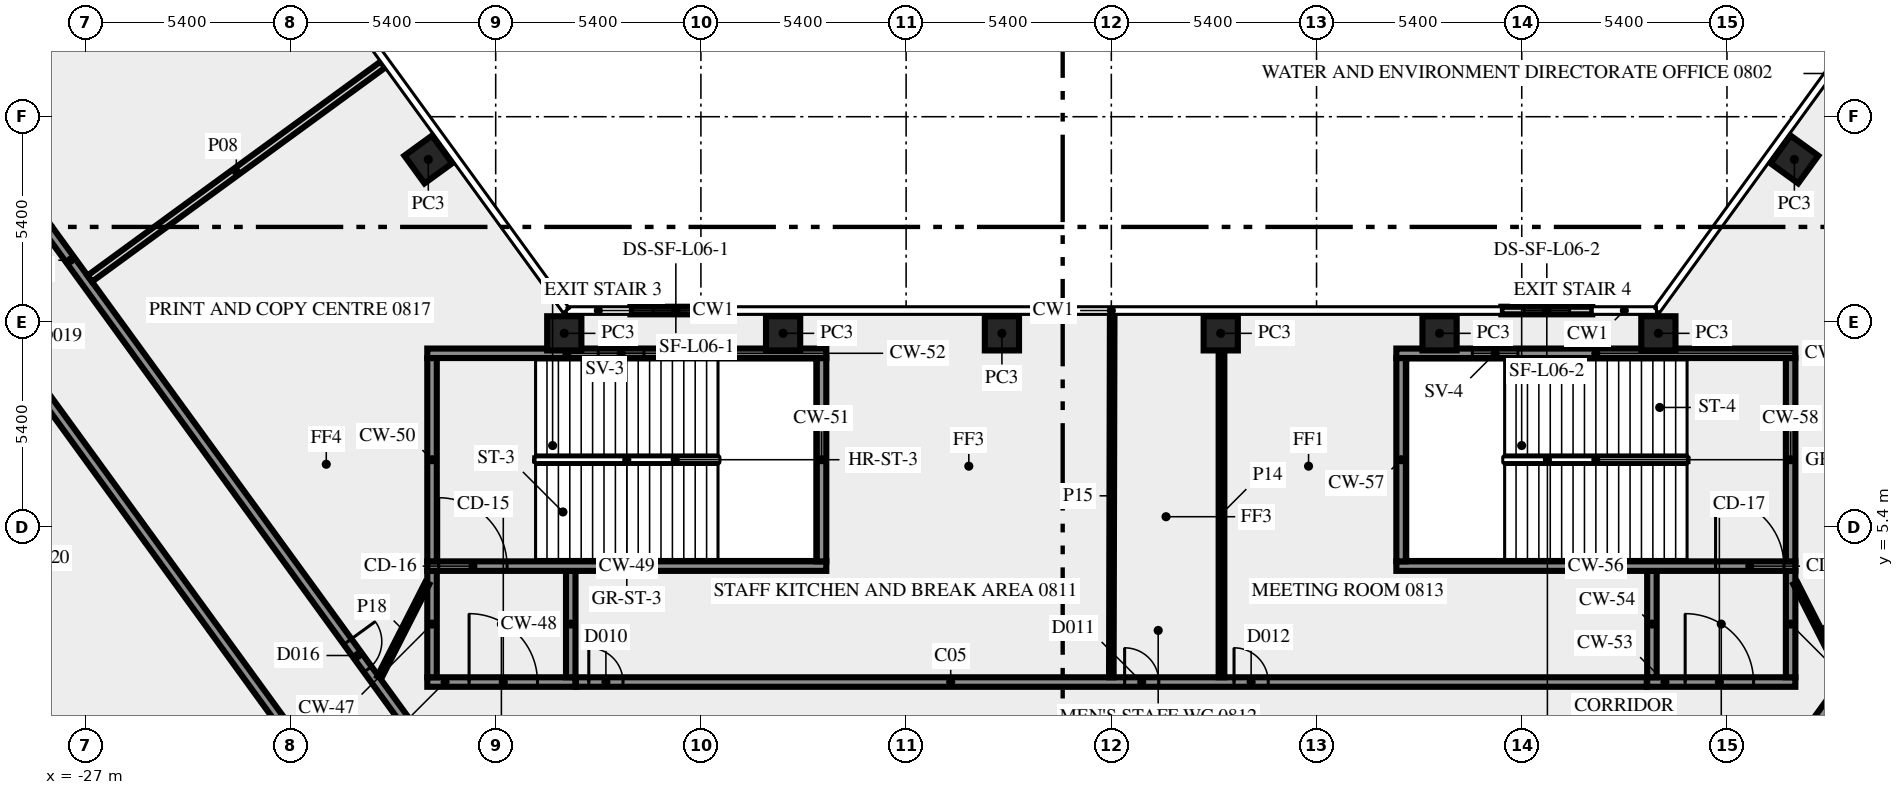
"""IFC4 building model, lengths in metres.
Left out: names, types, materials, properties, quantities, classifications, styles, units other than length and angle.
Written with IfcOpenShell. Run it as: python <this file> out.ifc"""

import sys

from ifc_helpers import new_model, si_unit, direction, frame, frame_2d, origin, origin_2d, place, context, subcontext, project, spatial, rectangle, extrude, element, fill, save


model = new_model("IFC4")
c1 = context("Model", 3, precision=1e-05, world=origin(), true_north=direction((0.0, 1.0)))
c2 = subcontext(c1, "Body", "Model", "MODEL_VIEW")
j1 = project(units=[si_unit("LENGTHUNIT", "METRE"), si_unit("PLANEANGLEUNIT", "RADIAN")], contexts=[c1])
p1 = place(None, origin())
s1 = spatial("IfcSite", under=j1, at=p1, CompositionType="ELEMENT")
p2 = place(p1, origin())
s2 = spatial("IfcBuilding", under=s1, at=p2, CompositionType="ELEMENT")
p3 = place(p2, frame((0.0, 0.0, 39.0)))
s3 = spatial("IfcBuildingStorey", under=s2, at=p3, CompositionType="ELEMENT", Elevation=39.0)
for number, where, z_axis, x_axis in (
    (1, (-17.974, 15.075, 0.0), (0.0, 0.0, 1.0), (-0.588, 0.809, 0.0)),
    (2, (17.974, 15.075, 0.0), (0.0, 0.0, 1.0), (-0.588, -0.809, 0.0)),
    (3, (14.395, 10.5, 0.0), (0.0, 0.0, 1.0), (-1.0, 0.0, 0.0)),
    (4, (8.637, 10.5, 0.0), (0.0, 0.0, 1.0), (-1.0, 0.0, 0.0)),
    (5, (2.879, 10.5, 0.0), (0.0, 0.0, 1.0), (-1.0, 0.0, 0.0)),
    (6, (-2.879, 10.5, 0.0), (0.0, 0.0, 1.0), (-1.0, 0.0, 0.0)),
    (7, (-8.637, 10.5, 0.0), (0.0, 0.0, 1.0), (-1.0, 0.0, 0.0)),
    (8, (-14.395, 10.5, 0.0), (0.0, 0.0, 1.0), (-1.0, 0.0, 0.0)),
):
    element("IfcColumn", number, at=place(p3, frame(where, z_axis=z_axis, x_axis=x_axis)), inside=s3, PredefinedType="COLUMN", context=c2, shape_type="SweptSolid", body=[
        extrude(rectangle(XDim=0.9, YDim=0.9, at=origin_2d()), origin(), (0.0, 0.0, 1.0), 3.65),
    ])
p4 = place(p3, frame((12.655, 11.1, 0.0), z_axis=(0.0, 0.0, 1.0), x_axis=(-1.0, 0.0, 0.0)))
e9 = element("IfcWall", 9, at=p4, inside=s3, PredefinedType="SOLIDWALL", context=c2, shape_type="SweptSolid", body=[
    extrude(rectangle(XDim=2.392, YDim=0.2, at=frame_2d((1.196, 0.0))), origin(), (0.0, 0.0, 1.0), 3.65),
])
p5 = place(p4, frame((0.596, 0.0, 1.0)))
e10 = element("IfcOpeningElement", 10, at=p5, cuts=e9, PredefinedType="OPENING", context=c2, shape_type="SweptSolid", body=[
    extrude(rectangle(XDim=1.2, YDim=1.2, at=frame_2d((0.6, 0.6))), frame((0.0, 0.11, 0.0), z_axis=(0.0, -1.0, 0.0), x_axis=(1.0, 0.0, 0.0)), (0.0, 0.0, 1.0), 0.22),
])
p6 = place(p3, frame((-10.263, 11.1, 0.0), z_axis=(0.0, 0.0, 1.0), x_axis=(-1.0, 0.0, 0.0)))
e11 = element("IfcWall", 11, at=p6, inside=s3, PredefinedType="SOLIDWALL", context=c2, shape_type="SweptSolid", body=[
    extrude(rectangle(XDim=2.392, YDim=0.2, at=frame_2d((1.196, 0.0))), origin(), (0.0, 0.0, 1.0), 3.65),
])
p7 = place(p6, frame((0.596, 0.0, 1.0)))
e12 = element("IfcOpeningElement", 12, at=p7, cuts=e11, PredefinedType="OPENING", context=c2, shape_type="SweptSolid", body=[
    extrude(rectangle(XDim=1.2, YDim=1.2, at=frame_2d((0.6, 0.6))), frame((0.0, 0.11, 0.0), z_axis=(0.0, -1.0, 0.0), x_axis=(1.0, 0.0, 0.0)), (0.0, 0.0, 1.0), 0.22),
])
p8 = place(p3, frame((-18.0, 1.325, 0.0), z_axis=(0.0, 0.0, 1.0), x_axis=(1.0, 0.0, 0.0)))
e13 = element("IfcWall", 13, at=p8, inside=s3, PredefinedType="SHEAR", context=c2, shape_type="SweptSolid", body=[
    extrude(rectangle(XDim=3.9, YDim=0.25, at=frame_2d((1.95, 0.0))), origin(), (0.0, 0.0, 1.0), 3.65),
])
p9 = place(p8, frame((1.1, 0.0, 0.0)))
e14 = element("IfcOpeningElement", 14, at=p9, cuts=e13, PredefinedType="OPENING", context=c2, shape_type="SweptSolid", body=[
    extrude(rectangle(XDim=1.8, YDim=2.1, at=frame_2d((0.9, 1.05))), frame((0.0, 0.135, 0.0), z_axis=(0.0, -1.0, 0.0), x_axis=(1.0, 0.0, 0.0)), (0.0, 0.0, 1.0), 0.27),
])
for number, where, z_axis, x_axis in (
    (15, (-17.875, 1.45, 0.0), (0.0, 0.0, 1.0), (0.0, 1.0, 0.0)),
    (16, (-14.225, 1.45, 0.0), (0.0, 0.0, 1.0), (0.0, 1.0, 0.0)),
):
    element("IfcWall", number, at=place(p3, frame(where, z_axis=z_axis, x_axis=x_axis)), inside=s3, PredefinedType="SHEAR", context=c2, shape_type="SweptSolid", body=[
        extrude(rectangle(XDim=2.8, YDim=0.25, at=frame_2d((1.4, 0.0))), origin(), (0.0, 0.0, 1.0), 3.65),
    ])
p10 = place(p3, frame((-18.0, 4.375, 0.0), z_axis=(0.0, 0.0, 1.0), x_axis=(1.0, 0.0, 0.0)))
e17 = element("IfcWall", 17, at=p10, inside=s3, PredefinedType="SHEAR", context=c2, shape_type="SweptSolid", body=[
    extrude(rectangle(XDim=10.5, YDim=0.25, at=frame_2d((5.25, 0.0))), origin(), (0.0, 0.0, 1.0), 3.65),
])
p11 = place(p10, frame((0.3, 0.0, 0.0)))
e18 = element("IfcOpeningElement", 18, at=p11, cuts=e17, PredefinedType="OPENING", context=c2, shape_type="SweptSolid", body=[
    extrude(rectangle(XDim=1.8, YDim=2.1, at=frame_2d((0.9, 1.05))), frame((0.0, 0.135, 0.0), z_axis=(0.0, -1.0, 0.0), x_axis=(1.0, 0.0, 0.0)), (0.0, 0.0, 1.0), 0.27),
])
for number, where, z_axis, x_axis in (
    (19, (-17.875, 4.5, 0.0), (0.0, 0.0, 1.0), (0.0, 1.0, 0.0)),
    (20, (-7.625, 4.5, 0.0), (0.0, 0.0, 1.0), (0.0, 1.0, 0.0)),
):
    element("IfcWall", number, at=place(p3, frame(where, z_axis=z_axis, x_axis=x_axis)), inside=s3, PredefinedType="SHEAR", context=c2, shape_type="SweptSolid", body=[
        extrude(rectangle(XDim=5.35, YDim=0.25, at=frame_2d((2.675, 0.0))), origin(), (0.0, 0.0, 1.0), 3.65),
    ])
p12 = place(p3, frame((-18.0, 9.975, 0.0), z_axis=(0.0, 0.0, 1.0), x_axis=(1.0, 0.0, 0.0)))
e21 = element("IfcWall", 21, at=p12, inside=s3, PredefinedType="SHEAR", context=c2, shape_type="SweptSolid", body=[
    extrude(rectangle(XDim=10.5, YDim=0.25, at=frame_2d((5.25, 0.0))), origin(), (0.0, 0.0, 1.0), 3.65),
])
p13 = place(p12, frame((4.5, 0.0, 1.0)))
e22 = element("IfcOpeningElement", 22, at=p13, cuts=e21, PredefinedType="OPENING", context=c2, shape_type="SweptSolid", body=[
    extrude(rectangle(XDim=1.2, YDim=1.2, at=frame_2d((0.6, 0.6))), frame((0.0, 0.135, 0.0), z_axis=(0.0, -1.0, 0.0), x_axis=(1.0, 0.0, 0.0)), (0.0, 0.0, 1.0), 0.27),
])
p14 = place(p3, frame((14.1, 1.325, 0.0), z_axis=(0.0, 0.0, 1.0), x_axis=(1.0, 0.0, 0.0)))
e23 = element("IfcWall", 23, at=p14, inside=s3, PredefinedType="SHEAR", context=c2, shape_type="SweptSolid", body=[
    extrude(rectangle(XDim=3.9, YDim=0.25, at=frame_2d((1.95, 0.0))), origin(), (0.0, 0.0, 1.0), 3.65),
])
p15 = place(p14, frame((1.0, 0.0, 0.0)))
e24 = element("IfcOpeningElement", 24, at=p15, cuts=e23, PredefinedType="OPENING", context=c2, shape_type="SweptSolid", body=[
    extrude(rectangle(XDim=1.8, YDim=2.1, at=frame_2d((0.9, 1.05))), frame((0.0, 0.135, 0.0), z_axis=(0.0, -1.0, 0.0), x_axis=(1.0, 0.0, 0.0)), (0.0, 0.0, 1.0), 0.27),
])
for number, where, z_axis, x_axis in (
    (25, (14.225, 1.45, 0.0), (0.0, 0.0, 1.0), (0.0, 1.0, 0.0)),
    (26, (17.875, 1.45, 0.0), (0.0, 0.0, 1.0), (0.0, 1.0, 0.0)),
):
    element("IfcWall", number, at=place(p3, frame(where, z_axis=z_axis, x_axis=x_axis)), inside=s3, PredefinedType="SHEAR", context=c2, shape_type="SweptSolid", body=[
        extrude(rectangle(XDim=2.8, YDim=0.25, at=frame_2d((1.4, 0.0))), origin(), (0.0, 0.0, 1.0), 3.65),
    ])
p16 = place(p3, frame((7.5, 4.375, 0.0), z_axis=(0.0, 0.0, 1.0), x_axis=(1.0, 0.0, 0.0)))
e27 = element("IfcWall", 27, at=p16, inside=s3, PredefinedType="SHEAR", context=c2, shape_type="SweptSolid", body=[
    extrude(rectangle(XDim=10.5, YDim=0.25, at=frame_2d((5.25, 0.0))), origin(), (0.0, 0.0, 1.0), 3.65),
])
p17 = place(p16, frame((8.4, 0.0, 0.0)))
e28 = element("IfcOpeningElement", 28, at=p17, cuts=e27, PredefinedType="OPENING", context=c2, shape_type="SweptSolid", body=[
    extrude(rectangle(XDim=1.8, YDim=2.1, at=frame_2d((0.9, 1.05))), frame((0.0, 0.135, 0.0), z_axis=(0.0, -1.0, 0.0), x_axis=(1.0, 0.0, 0.0)), (0.0, 0.0, 1.0), 0.27),
])
for number, where, z_axis, x_axis in (
    (29, (7.625, 4.5, 0.0), (0.0, 0.0, 1.0), (0.0, 1.0, 0.0)),
    (30, (17.875, 4.5, 0.0), (0.0, 0.0, 1.0), (0.0, 1.0, 0.0)),
):
    element("IfcWall", number, at=place(p3, frame(where, z_axis=z_axis, x_axis=x_axis)), inside=s3, PredefinedType="SHEAR", context=c2, shape_type="SweptSolid", body=[
        extrude(rectangle(XDim=5.35, YDim=0.25, at=frame_2d((2.675, 0.0))), origin(), (0.0, 0.0, 1.0), 3.65),
    ])
p18 = place(p3, frame((7.5, 9.975, 0.0), z_axis=(0.0, 0.0, 1.0), x_axis=(1.0, 0.0, 0.0)))
e31 = element("IfcWall", 31, at=p18, inside=s3, PredefinedType="SHEAR", context=c2, shape_type="SweptSolid", body=[
    extrude(rectangle(XDim=10.5, YDim=0.25, at=frame_2d((5.25, 0.0))), origin(), (0.0, 0.0, 1.0), 3.65),
])
p19 = place(p18, frame((2.0, 0.0, 1.0)))
e32 = element("IfcOpeningElement", 32, at=p19, cuts=e31, PredefinedType="OPENING", context=c2, shape_type="SweptSolid", body=[
    extrude(rectangle(XDim=1.2, YDim=1.2, at=frame_2d((0.6, 0.6))), frame((0.0, 0.135, 0.0), z_axis=(0.0, -1.0, 0.0), x_axis=(1.0, 0.0, 0.0)), (0.0, 0.0, 1.0), 0.27),
])
p20 = place(p3, frame((-20.531, -1.523, 0.0), z_axis=(0.0, 0.0, 1.0), x_axis=(-0.587784593204, 0.809017473231, 0.0)))
e33 = element("IfcWall", 33, at=p20, inside=s3, PredefinedType="SOLIDWALL", context=c2, shape_type="SweptSolid", body=[
    extrude(rectangle(XDim=44.67, YDim=0.25, at=frame_2d((22.335, 0.0))), origin(), (0.0, 0.0, 1.0), 3.65),
])
p21 = place(p20, frame((30.765, 0.0, 0.0)))
e34 = element("IfcOpeningElement", 34, at=p21, cuts=e33, PredefinedType="OPENING", context=c2, shape_type="SweptSolid", body=[
    extrude(rectangle(XDim=0.9, YDim=2.1, at=frame_2d((0.45, 1.05))), frame((0.0, 0.135, 0.0), z_axis=(0.0, -1.0, 0.0), x_axis=(1.0, 0.0, 0.0)), (0.0, 0.0, 1.0), 0.27),
])
p22 = place(p20, frame((14.316, 0.0, 0.0)))
e35 = element("IfcOpeningElement", 35, at=p22, cuts=e33, PredefinedType="OPENING", context=c2, shape_type="SweptSolid", body=[
    extrude(rectangle(XDim=0.9, YDim=2.1, at=frame_2d((0.45, 1.05))), frame((0.0, 0.135, 0.0), z_axis=(0.0, -1.0, 0.0), x_axis=(1.0, 0.0, 0.0)), (0.0, 0.0, 1.0), 0.27),
])
p23 = place(p20, frame((29.166, 0.0, 0.0)))
e36 = element("IfcOpeningElement", 36, at=p23, cuts=e33, PredefinedType="OPENING", context=c2, shape_type="SweptSolid", body=[
    extrude(rectangle(XDim=0.9, YDim=2.1, at=frame_2d((0.45, 1.05))), frame((0.0, 0.135, 0.0), z_axis=(0.0, -1.0, 0.0), x_axis=(1.0, 0.0, 0.0)), (0.0, 0.0, 1.0), 0.27),
])
p24 = place(p3, frame((-37.232, 25.972, 0.0), z_axis=(0.0, 0.0, 1.0), x_axis=(0.587786323093, -0.809016216391, 0.0)))
e37 = element("IfcWall", 37, at=p24, inside=s3, PredefinedType="SOLIDWALL", context=c2, shape_type="SweptSolid", body=[
    extrude(rectangle(XDim=33.493, YDim=0.25, at=frame_2d((16.747, 0.0))), origin(), (0.0, 0.0, 1.0), 3.65),
])
p25 = place(p24, frame((8.335, 0.0, 0.0)))
e38 = element("IfcOpeningElement", 38, at=p25, cuts=e37, PredefinedType="OPENING", context=c2, shape_type="SweptSolid", body=[
    extrude(rectangle(XDim=0.9, YDim=2.1, at=frame_2d((0.45, 1.05))), frame((0.0, 0.135, 0.0), z_axis=(0.0, -1.0, 0.0), x_axis=(1.0, 0.0, 0.0)), (0.0, 0.0, 1.0), 0.27),
])
p26 = place(p24, frame((29.152, 0.0, 0.0)))
e39 = element("IfcOpeningElement", 39, at=p26, cuts=e37, PredefinedType="OPENING", context=c2, shape_type="SweptSolid", body=[
    extrude(rectangle(XDim=0.9, YDim=2.1, at=frame_2d((0.45, 1.05))), frame((0.0, 0.135, 0.0), z_axis=(0.0, -1.0, 0.0), x_axis=(1.0, 0.0, 0.0)), (0.0, 0.0, 1.0), 0.27),
])
p27 = place(p24, frame((6.735, 0.0, 0.0)))
e40 = element("IfcOpeningElement", 40, at=p27, cuts=e37, PredefinedType="OPENING", context=c2, shape_type="SweptSolid", body=[
    extrude(rectangle(XDim=0.9, YDim=2.1, at=frame_2d((0.45, 1.05))), frame((0.0, 0.135, 0.0), z_axis=(0.0, -1.0, 0.0), x_axis=(1.0, 0.0, 0.0)), (0.0, 0.0, 1.0), 0.27),
])
p28 = place(p3, frame((-14.09, 1.325, 0.0), z_axis=(0.0, 0.0, 1.0), x_axis=(1.0, 0.0, 0.0)))
e41 = element("IfcWall", 41, at=p28, inside=s3, PredefinedType="SOLIDWALL", context=c2, shape_type="SweptSolid", body=[
    extrude(rectangle(XDim=28.18, YDim=0.25, at=frame_2d((14.09, 0.0))), origin(), (0.0, 0.0, 1.0), 3.65),
])
p29 = place(p28, frame((17.319, 0.0, 0.0)))
e42 = element("IfcOpeningElement", 42, at=p29, cuts=e41, PredefinedType="OPENING", context=c2, shape_type="SweptSolid", body=[
    extrude(rectangle(XDim=0.9, YDim=2.1, at=frame_2d((0.45, 1.05))), frame((0.0, 0.135, 0.0), z_axis=(0.0, -1.0, 0.0), x_axis=(1.0, 0.0, 0.0)), (0.0, 0.0, 1.0), 0.27),
])
p30 = place(p28, frame((14.44, 0.0, 0.0)))
e43 = element("IfcOpeningElement", 43, at=p30, cuts=e41, PredefinedType="OPENING", context=c2, shape_type="SweptSolid", body=[
    extrude(rectangle(XDim=0.9, YDim=2.1, at=frame_2d((0.45, 1.05))), frame((0.0, 0.135, 0.0), z_axis=(0.0, -1.0, 0.0), x_axis=(1.0, 0.0, 0.0)), (0.0, 0.0, 1.0), 0.27),
])
p31 = place(p28, frame((0.34, 0.0, 0.0)))
e44 = element("IfcOpeningElement", 44, at=p31, cuts=e41, PredefinedType="OPENING", context=c2, shape_type="SweptSolid", body=[
    extrude(rectangle(XDim=0.9, YDim=2.1, at=frame_2d((0.45, 1.05))), frame((0.0, 0.135, 0.0), z_axis=(0.0, -1.0, 0.0), x_axis=(1.0, 0.0, 0.0)), (0.0, 0.0, 1.0), 0.27),
])
p32 = place(p3, frame((17.545, -1.125, 0.0), z_axis=(0.0, 0.0, 1.0), x_axis=(0.587786323093, 0.809016216391, 0.0)))
e45 = element("IfcWall", 45, at=p32, inside=s3, PredefinedType="SOLIDWALL", context=c2, shape_type="SweptSolid", body=[
    extrude(rectangle(XDim=33.493, YDim=0.25, at=frame_2d((16.747, 0.0))), origin(), (0.0, 0.0, 1.0), 3.65),
])
p33 = place(p32, frame((25.857, 0.0, 0.0)))
e46 = element("IfcOpeningElement", 46, at=p33, cuts=e45, PredefinedType="OPENING", context=c2, shape_type="SweptSolid", body=[
    extrude(rectangle(XDim=0.9, YDim=2.1, at=frame_2d((0.45, 1.05))), frame((0.0, 0.135, 0.0), z_axis=(0.0, -1.0, 0.0), x_axis=(1.0, 0.0, 0.0)), (0.0, 0.0, 1.0), 0.27),
])
p34 = place(p32, frame((24.157, 0.0, 0.0)))
e47 = element("IfcOpeningElement", 47, at=p34, cuts=e45, PredefinedType="OPENING", context=c2, shape_type="SweptSolid", body=[
    extrude(rectangle(XDim=1.0, YDim=2.1, at=frame_2d((0.5, 1.05))), frame((0.0, 0.135, 0.0), z_axis=(0.0, -1.0, 0.0), x_axis=(1.0, 0.0, 0.0)), (0.0, 0.0, 1.0), 0.27),
])
p35 = place(p3, frame((-26.882, 11.94, 0.0), z_axis=(0.0, 0.0, 1.0), x_axis=(0.807664588563, 0.589642190131, 0.0)))
e48 = element("IfcWall", 48, at=p35, inside=s3, PredefinedType="SOLIDWALL", context=c2, shape_type="SweptSolid", body=[
    extrude(rectangle(XDim=9.55, YDim=0.2, at=frame_2d((4.775, 0.0))), origin(), (0.0, 0.0, 1.0), 2.75),
])
p36 = place(p3, frame((2.899, 10.045, 0.0), z_axis=(0.0, 0.0, 1.0), x_axis=(0.0, -1.0, 0.0)))
e49 = element("IfcWall", 49, at=p36, inside=s3, PredefinedType="PARTITIONING", context=c2, shape_type="SweptSolid", body=[
    extrude(rectangle(XDim=8.595, YDim=0.15, at=frame_2d((4.297, 0.0))), origin(), (0.0, 0.0, 1.0), 3.65),
])
p37 = place(p3, frame((0.023, 11.0, 0.0), z_axis=(0.0, 0.0, 1.0), x_axis=(-0.002377476217, -0.999997173799, 0.0)))
e50 = element("IfcWall", 50, at=p37, inside=s3, PredefinedType="PARTITIONING", context=c2, shape_type="SweptSolid", body=[
    extrude(rectangle(XDim=9.55, YDim=0.12, at=frame_2d((4.775, 0.0))), origin(), (0.0, 0.0, 1.0), 2.75),
])
for number, where, z_axis, x_axis in (
    (51, (18.0, 3.925, 0.0), (0.0, 0.0, 1.0), (0.454, -0.891, 0.0)),
    (52, (-19.261, 1.45, 0.0), (0.0, 0.0, 1.0), (0.454, 0.891, 0.0)),
):
    element("IfcWall", number, at=place(p3, frame(where, z_axis=z_axis, x_axis=x_axis)), inside=s3, PredefinedType="PARTITIONING", context=c2, shape_type="SweptSolid", body=[
        extrude(rectangle(XDim=2.778, YDim=0.12, at=frame_2d((1.389, 0.0))), origin(), (0.0, 0.0, 1.0), 3.65),
    ])
p38 = place(p5, origin())
e53 = element("IfcWindow", 53, at=p38, inside=s3, PartitioningType="SINGLE_PANEL", PredefinedType="WINDOW", context=c2, shape_type="SweptSolid", body=[
    extrude(rectangle(XDim=1.2, YDim=1.2, at=frame_2d((0.6, 0.6))), frame((0.0, 0.03, 0.0), z_axis=(0.0, -1.0, 0.0), x_axis=(1.0, 0.0, 0.0)), (0.0, 0.0, 1.0), 0.06),
])
fill(e10, e53)
p39 = place(p7, origin())
e54 = element("IfcWindow", 54, at=p39, inside=s3, PartitioningType="SINGLE_PANEL", PredefinedType="WINDOW", context=c2, shape_type="SweptSolid", body=[
    extrude(rectangle(XDim=1.2, YDim=1.2, at=frame_2d((0.6, 0.6))), frame((0.0, 0.03, 0.0), z_axis=(0.0, -1.0, 0.0), x_axis=(1.0, 0.0, 0.0)), (0.0, 0.0, 1.0), 0.06),
])
fill(e12, e54)
p40 = place(p9, origin())
e55 = element("IfcDoor", 55, at=p40, inside=s3, OperationType="DOUBLE_DOOR_SINGLE_SWING", PredefinedType="DOOR", context=c2, shape_type="SweptSolid", body=[
    extrude(rectangle(XDim=1.8, YDim=2.1, at=frame_2d((0.9, 1.05))), frame((0.0, 0.025, 0.0), z_axis=(0.0, -1.0, 0.0), x_axis=(1.0, 0.0, 0.0)), (0.0, 0.0, 1.0), 0.05),
])
fill(e14, e55)
p41 = place(p11, origin())
e56 = element("IfcDoor", 56, at=p41, inside=s3, OperationType="DOUBLE_DOOR_SINGLE_SWING", PredefinedType="DOOR", context=c2, shape_type="SweptSolid", body=[
    extrude(rectangle(XDim=1.8, YDim=2.1, at=frame_2d((0.9, 1.05))), frame((0.0, 0.025, 0.0), z_axis=(0.0, -1.0, 0.0), x_axis=(1.0, 0.0, 0.0)), (0.0, 0.0, 1.0), 0.05),
])
fill(e18, e56)
p42 = place(p13, origin())
e57 = element("IfcWindow", 57, at=p42, inside=s3, PartitioningType="SINGLE_PANEL", PredefinedType="WINDOW", context=c2, shape_type="SweptSolid", body=[
    extrude(rectangle(XDim=1.2, YDim=1.2, at=frame_2d((0.6, 0.6))), frame((0.0, 0.03, 0.0), z_axis=(0.0, -1.0, 0.0), x_axis=(1.0, 0.0, 0.0)), (0.0, 0.0, 1.0), 0.06),
])
fill(e22, e57)
p43 = place(p15, origin())
e58 = element("IfcDoor", 58, at=p43, inside=s3, OperationType="DOUBLE_DOOR_SINGLE_SWING", PredefinedType="DOOR", context=c2, shape_type="SweptSolid", body=[
    extrude(rectangle(XDim=1.8, YDim=2.1, at=frame_2d((0.9, 1.05))), frame((0.0, 0.025, 0.0), z_axis=(0.0, -1.0, 0.0), x_axis=(1.0, 0.0, 0.0)), (0.0, 0.0, 1.0), 0.05),
])
fill(e24, e58)
p44 = place(p17, origin())
e59 = element("IfcDoor", 59, at=p44, inside=s3, OperationType="DOUBLE_DOOR_SINGLE_SWING", PredefinedType="DOOR", context=c2, shape_type="SweptSolid", body=[
    extrude(rectangle(XDim=1.8, YDim=2.1, at=frame_2d((0.9, 1.05))), frame((0.0, 0.025, 0.0), z_axis=(0.0, -1.0, 0.0), x_axis=(1.0, 0.0, 0.0)), (0.0, 0.0, 1.0), 0.05),
])
fill(e28, e59)
p45 = place(p19, origin())
e60 = element("IfcWindow", 60, at=p45, inside=s3, PartitioningType="SINGLE_PANEL", PredefinedType="WINDOW", context=c2, shape_type="SweptSolid", body=[
    extrude(rectangle(XDim=1.2, YDim=1.2, at=frame_2d((0.6, 0.6))), frame((0.0, 0.03, 0.0), z_axis=(0.0, -1.0, 0.0), x_axis=(1.0, 0.0, 0.0)), (0.0, 0.0, 1.0), 0.06),
])
fill(e32, e60)
p46 = place(p29, origin())
e61 = element("IfcDoor", 61, at=p46, inside=s3, OperationType="SINGLE_SWING_LEFT", PredefinedType="DOOR", context=c2, shape_type="SweptSolid", body=[
    extrude(rectangle(XDim=0.9, YDim=2.1, at=frame_2d((0.45, 1.05))), frame((0.0, 0.025, 0.0), z_axis=(0.0, -1.0, 0.0), x_axis=(1.0, 0.0, 0.0)), (0.0, 0.0, 1.0), 0.05),
])
fill(e42, e61)
p47 = place(p30, origin())
e62 = element("IfcDoor", 62, at=p47, inside=s3, OperationType="SINGLE_SWING_LEFT", PredefinedType="DOOR", context=c2, shape_type="SweptSolid", body=[
    extrude(rectangle(XDim=0.9, YDim=2.1, at=frame_2d((0.45, 1.05))), frame((0.0, 0.025, 0.0), z_axis=(0.0, -1.0, 0.0), x_axis=(1.0, 0.0, 0.0)), (0.0, 0.0, 1.0), 0.05),
])
fill(e43, e62)
p48 = place(p26, origin())
e63 = element("IfcDoor", 63, at=p48, inside=s3, OperationType="SINGLE_SWING_RIGHT", PredefinedType="DOOR", context=c2, shape_type="SweptSolid", body=[
    extrude(rectangle(XDim=0.9, YDim=2.1, at=frame_2d((0.45, 1.05))), frame((0.0, 0.025, 0.0), z_axis=(0.0, -1.0, 0.0), x_axis=(1.0, 0.0, 0.0)), (0.0, 0.0, 1.0), 0.05),
])
fill(e39, e63)
p49 = place(p31, origin())
e64 = element("IfcDoor", 64, at=p49, inside=s3, OperationType="SINGLE_SWING_LEFT", PredefinedType="DOOR", context=c2, shape_type="SweptSolid", body=[
    extrude(rectangle(XDim=0.9, YDim=2.1, at=frame_2d((0.45, 1.05))), frame((0.0, 0.025, 0.0), z_axis=(0.0, -1.0, 0.0), x_axis=(1.0, 0.0, 0.0)), (0.0, 0.0, 1.0), 0.05),
])
fill(e44, e64)
save(model, sys.argv[1])
